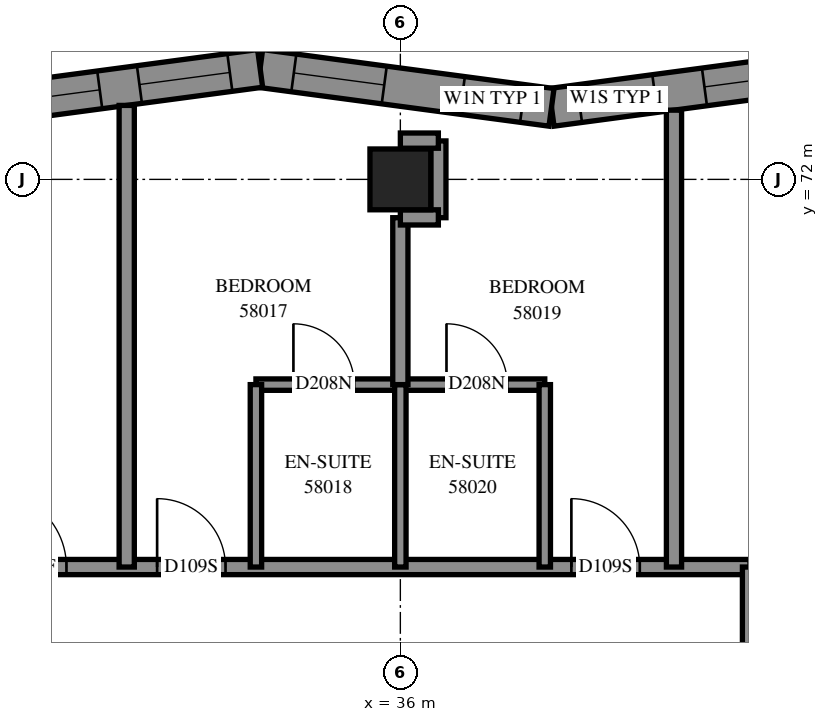
"""IFC4 building model, lengths in metres.
Left out: names, types, materials, properties, quantities, classifications, styles, units other than length and angle.
Written with IfcOpenShell. Run it as: python <this file> out.ifc"""

import sys

from ifc_helpers import new_model, si_unit, direction, frame, frame_2d, origin, origin_2d, place, context, subcontext, project, spatial, polyline, rectangle, outline, extrude, element, fill, save


model = new_model("IFC4")
c1 = context("Model", 3, precision=1e-05, world=origin(), true_north=direction((0.0, 1.0)))
c2 = subcontext(c1, "Body", "Model", "MODEL_VIEW")
j1 = project(units=[si_unit("LENGTHUNIT", "METRE"), si_unit("PLANEANGLEUNIT", "RADIAN")], contexts=[c1])
p1 = place(None, origin())
s1 = spatial("IfcSite", under=j1, at=p1, CompositionType="ELEMENT")
p2 = place(p1, origin())
s2 = spatial("IfcBuilding", under=s1, at=p2, CompositionType="ELEMENT")
p3 = place(p2, frame((0.0, 0.0, 213.4)))
s3 = spatial("IfcBuildingStorey", under=s2, at=p3, CompositionType="ELEMENT", Elevation=213.4)
p4 = place(p3, frame((36.0, 72.0, 0.0), z_axis=(0.0, 0.0, 1.0), x_axis=(1.0, 0.0, 0.0)))
e1 = element("IfcColumn", 1, at=p4, inside=s3, PredefinedType="COLUMN", context=c2, shape_type="SweptSolid", body=[
    extrude(rectangle(XDim=0.8, YDim=0.8, at=origin_2d()), origin(), (0.0, 0.0, 1.0), 3.1),
])
p5 = place(p3, frame((41.822, 73.46, 0.0), z_axis=(0.0, 0.0, 1.0), x_axis=(-0.9911985198, -0.13238389, 0.0)))
e2 = element("IfcWall", 2, at=p5, inside=s3, PredefinedType="SOLIDWALL", context=c2, shape_type="SweptSolid", body=[
    extrude(outline(polyline([(-0.033, -0.25), (3.834, -0.25), (3.901, 0.25), (0.033, 0.25), (-0.033, -0.25)])), origin(), (0.0, 0.0, 1.0), 3.1),
])
p6 = place(p5, frame((0.638, 0.0, 0.45)))
e3 = element("IfcOpeningElement", 3, at=p6, cuts=e2, PredefinedType="OPENING", context=c2, shape_type="SweptSolid", body=[
    extrude(rectangle(XDim=1.2, YDim=2.5, at=frame_2d((0.6, 1.25))), frame((0.0, 0.26, 0.0), z_axis=(0.0, -1.0, 0.0), x_axis=(1.0, 0.0, 0.0)), (0.0, 0.0, 1.0), 0.52),
])
p7 = place(p5, frame((2.496, 0.0, 0.45)))
e4 = element("IfcOpeningElement", 4, at=p7, cuts=e2, PredefinedType="OPENING", context=c2, shape_type="SweptSolid", body=[
    extrude(rectangle(XDim=1.0, YDim=2.5, at=frame_2d((0.5, 1.25))), frame((0.0, 0.26, 0.0), z_axis=(0.0, -1.0, 0.0), x_axis=(1.0, 0.0, 0.0)), (0.0, 0.0, 1.0), 0.52),
])
p8 = place(p3, frame((37.989, 72.948, 0.0), z_axis=(0.0, 0.0, 1.0), x_axis=(-0.9911989729, 0.1323804972, 0.0)))
e5 = element("IfcWall", 5, at=p8, inside=s3, PredefinedType="SOLIDWALL", context=c2, shape_type="SweptSolid", body=[
    extrude(outline(polyline([(0.033, -0.25), (3.901, -0.25), (3.834, 0.25), (-0.033, 0.25), (0.033, -0.25)])), origin(), (0.0, 0.0, 1.0), 3.1),
])
p9 = place(p8, frame((2.22, 0.0, 0.45)))
e6 = element("IfcOpeningElement", 6, at=p9, cuts=e5, PredefinedType="OPENING", context=c2, shape_type="SweptSolid", body=[
    extrude(rectangle(XDim=1.2, YDim=2.5, at=frame_2d((0.6, 1.25))), frame((0.0, 0.26, 0.0), z_axis=(0.0, -1.0, 0.0), x_axis=(1.0, 0.0, 0.0)), (0.0, 0.0, 1.0), 0.52),
])
p10 = place(p8, frame((0.384, 0.0, 0.45)))
e7 = element("IfcOpeningElement", 7, at=p10, cuts=e5, PredefinedType="OPENING", context=c2, shape_type="SweptSolid", body=[
    extrude(rectangle(XDim=0.8, YDim=2.5, at=frame_2d((0.4, 1.25))), frame((0.0, 0.26, 0.0), z_axis=(0.0, -1.0, 0.0), x_axis=(1.0, 0.0, 0.0)), (0.0, 0.0, 1.0), 0.52),
])
p11 = place(p3, frame((34.155, 73.46, 0.0), z_axis=(0.0, 0.0, 1.0), x_axis=(-0.991196865, -0.1323962796, 0.0)))
e8 = element("IfcWall", 8, at=p11, inside=s3, PredefinedType="SOLIDWALL", context=c2, shape_type="SweptSolid", body=[
    extrude(outline(polyline([(-0.033, -0.25), (3.834, -0.25), (3.939, 0.25), (0.033, 0.25), (-0.033, -0.25)])), origin(), (0.0, 0.0, 1.0), 3.1),
])
p12 = place(p11, frame((0.402, 0.0, 0.45)))
e9 = element("IfcOpeningElement", 9, at=p12, cuts=e8, PredefinedType="OPENING", context=c2, shape_type="SweptSolid", body=[
    extrude(rectangle(XDim=1.2, YDim=2.5, at=frame_2d((0.6, 1.25))), frame((0.0, 0.26, 0.0), z_axis=(0.0, -1.0, 0.0), x_axis=(1.0, 0.0, 0.0)), (0.0, 0.0, 1.0), 0.52),
])
p13 = place(p11, frame((2.129, 0.0, 0.45)))
e10 = element("IfcOpeningElement", 10, at=p13, cuts=e8, PredefinedType="OPENING", context=c2, shape_type="SweptSolid", body=[
    extrude(rectangle(XDim=1.2, YDim=2.5, at=frame_2d((0.6, 1.25))), frame((0.0, 0.26, 0.0), z_axis=(0.0, -1.0, 0.0), x_axis=(1.0, 0.0, 0.0)), (0.0, 0.0, 1.0), 0.52),
])
p14 = place(p3, frame((28.802, 66.9, 0.0), z_axis=(0.0, 0.0, 1.0), x_axis=(1.0, 0.0, 0.0)))
e11 = element("IfcWall", 11, at=p14, inside=s3, PredefinedType="PARTITIONING", context=c2, shape_type="SweptSolid", body=[
    extrude(rectangle(XDim=11.798, YDim=0.2, at=frame_2d((5.899, 0.0))), origin(), (0.0, 0.0, 1.0), 3.1),
])
p15 = place(p14, frame((1.805, 0.0, 0.0)))
e12 = element("IfcOpeningElement", 12, at=p15, cuts=e11, PredefinedType="OPENING", context=c2, shape_type="SweptSolid", body=[
    extrude(rectangle(XDim=1.0, YDim=2.1, at=frame_2d((0.5, 1.05))), frame((0.0, 0.11, 0.0), z_axis=(0.0, -1.0, 0.0), x_axis=(1.0, 0.0, 0.0)), (0.0, 0.0, 1.0), 0.22),
])
p16 = place(p14, frame((3.998, 0.0, 0.0)))
e13 = element("IfcOpeningElement", 13, at=p16, cuts=e11, PredefinedType="OPENING", context=c2, shape_type="SweptSolid", body=[
    extrude(rectangle(XDim=0.9, YDim=2.1, at=frame_2d((0.45, 1.05))), frame((0.0, 0.11, 0.0), z_axis=(0.0, -1.0, 0.0), x_axis=(1.0, 0.0, 0.0)), (0.0, 0.0, 1.0), 0.22),
])
p17 = place(p14, frame((9.448, 0.0, 0.0)))
e14 = element("IfcOpeningElement", 14, at=p17, cuts=e11, PredefinedType="OPENING", context=c2, shape_type="SweptSolid", body=[
    extrude(rectangle(XDim=0.9, YDim=2.1, at=frame_2d((0.45, 1.05))), frame((0.0, 0.11, 0.0), z_axis=(0.0, -1.0, 0.0), x_axis=(1.0, 0.0, 0.0)), (0.0, 0.0, 1.0), 0.22),
])
p18 = place(p3, frame((32.4, 66.9, 0.0), z_axis=(0.0, 0.0, 1.0), x_axis=(0.0, 1.0, 0.0)))
e15 = element("IfcWall", 15, at=p18, inside=s3, PredefinedType="PARTITIONING", context=c2, shape_type="SweptSolid", body=[
    extrude(rectangle(XDim=6.073, YDim=0.2, at=frame_2d((3.037, 0.0))), origin(), (0.0, 0.0, 1.0), 3.1),
])
p19 = place(p3, frame((39.6, 66.9, 0.0), z_axis=(0.0, 0.0, 1.0), x_axis=(0.0, 1.0, 0.0)))
e16 = element("IfcWall", 16, at=p19, inside=s3, PredefinedType="PARTITIONING", context=c2, shape_type="SweptSolid", body=[
    extrude(rectangle(XDim=6.011, YDim=0.2, at=frame_2d((3.005, 0.0))), origin(), (0.0, 0.0, 1.0), 3.1),
])
p20 = place(p3, frame((40.6, 62.202, 0.0), z_axis=(0.0, 0.0, 1.0), x_axis=(0.0, 1.0, 0.0)))
e17 = element("IfcWall", 17, at=p20, inside=s3, PredefinedType="PARTITIONING", context=c2, shape_type="SweptSolid", body=[
    extrude(rectangle(XDim=4.698, YDim=0.2, at=frame_2d((2.349, 0.0))), origin(), (0.0, 0.0, 1.0), 3.1),
])
p21 = place(p20, frame((2.51, 0.0, 0.0)))
e18 = element("IfcOpeningElement", 18, at=p21, cuts=e17, PredefinedType="OPENING", context=c2, shape_type="SweptSolid", body=[
    extrude(rectangle(XDim=0.9, YDim=2.1, at=frame_2d((0.45, 1.05))), frame((0.0, 0.11, 0.0), z_axis=(0.0, -1.0, 0.0), x_axis=(1.0, 0.0, 0.0)), (0.0, 0.0, 1.0), 0.22),
])
p22 = place(p3, frame((34.1, 69.3, 0.0), z_axis=(0.0, 0.0, 1.0), x_axis=(1.0, 0.0, 0.0)))
e19 = element("IfcWall", 19, at=p22, inside=s3, PredefinedType="PARTITIONING", context=c2, shape_type="SweptSolid", body=[
    extrude(rectangle(XDim=3.8, YDim=0.15, at=frame_2d((1.9, 0.0))), origin(), (0.0, 0.0, 1.0), 3.1),
])
p23 = place(p22, frame((0.493, 0.0, 0.0)))
e20 = element("IfcOpeningElement", 20, at=p23, cuts=e19, PredefinedType="OPENING", context=c2, shape_type="SweptSolid", body=[
    extrude(rectangle(XDim=0.8, YDim=2.1, at=frame_2d((0.4, 1.05))), frame((0.0, 0.085, 0.0), z_axis=(0.0, -1.0, 0.0), x_axis=(1.0, 0.0, 0.0)), (0.0, 0.0, 1.0), 0.17),
])
p24 = place(p22, frame((2.507, 0.0, 0.0)))
e21 = element("IfcOpeningElement", 21, at=p24, cuts=e19, PredefinedType="OPENING", context=c2, shape_type="SweptSolid", body=[
    extrude(rectangle(XDim=0.8, YDim=2.1, at=frame_2d((0.4, 1.05))), frame((0.0, 0.085, 0.0), z_axis=(0.0, -1.0, 0.0), x_axis=(1.0, 0.0, 0.0)), (0.0, 0.0, 1.0), 0.17),
])
for number, where, z_axis, x_axis in (
    (22, (34.1, 66.9, 0.0), (0.0, 0.0, 1.0), (0.0, 1.0, 0.0)),
    (23, (36.0, 66.9, 0.0), (0.0, 0.0, 1.0), (0.0, 1.0, 0.0)),
    (24, (37.9, 66.9, 0.0), (0.0, 0.0, 1.0), (0.0, 1.0, 0.0)),
):
    element("IfcWall", number, at=place(p3, frame(where, z_axis=z_axis, x_axis=x_axis)), inside=s3, PredefinedType="PARTITIONING", context=c2, shape_type="SweptSolid", body=[
        extrude(rectangle(XDim=2.4, YDim=0.15, at=frame_2d((1.2, 0.0))), origin(), (0.0, 0.0, 1.0), 3.1),
    ])
p25 = place(p3, frame((36.0, 69.3, 0.0), z_axis=(0.0, 0.0, 1.0), x_axis=(0.0, 1.0, 0.0)))
e25 = element("IfcWall", 25, at=p25, inside=s3, PredefinedType="PARTITIONING", context=c2, shape_type="SweptSolid", body=[
    extrude(rectangle(XDim=2.196, YDim=0.2, at=frame_2d((1.098, 0.0))), origin(), (0.0, 0.0, 1.0), 3.1),
])
p26 = place(p3, frame((36.5, 71.496, 0.0), z_axis=(0.0, 0.0, 1.0), x_axis=(0.0, 1.0, 0.0)))
e26 = element("IfcWall", 26, at=p26, inside=s3, PredefinedType="PARTITIONING", context=c2, shape_type="SweptSolid", body=[
    extrude(rectangle(XDim=1.01, YDim=0.2, at=frame_2d((0.505, 0.0))), origin(), (0.0, 0.0, 1.0), 3.1),
])
for number, where, z_axis, x_axis in (
    (27, (36.0, 72.51, 0.0), (0.0, 0.0, 1.0), (1.0, 0.0, 0.0)),
    (28, (36.0, 71.5, 0.0), (0.0, 0.0, 1.0), (1.0, 0.0, 0.0)),
):
    element("IfcWall", number, at=place(p3, frame(where, z_axis=z_axis, x_axis=x_axis)), inside=s3, PredefinedType="PARTITIONING", context=c2, shape_type="SweptSolid", body=[
        extrude(rectangle(XDim=0.5, YDim=0.2, at=frame_2d((0.25, 0.0))), origin(), (0.0, 0.0, 1.0), 3.1),
    ])
p27 = place(p6, origin())
e29 = element("IfcWindow", 29, at=p27, inside=s3, PartitioningType="SINGLE_PANEL", PredefinedType="WINDOW", context=c2, shape_type="SweptSolid", body=[
    extrude(rectangle(XDim=1.2, YDim=2.5, at=frame_2d((0.6, 1.25))), frame((0.0, 0.18, 0.0), z_axis=(0.0, -1.0, 0.0), x_axis=(1.0, 0.0, 0.0)), (0.0, 0.0, 1.0), 0.06),
])
fill(e3, e29)
p28 = place(p9, origin())
e30 = element("IfcWindow", 30, at=p28, inside=s3, PartitioningType="SINGLE_PANEL", PredefinedType="WINDOW", context=c2, shape_type="SweptSolid", body=[
    extrude(rectangle(XDim=1.2, YDim=2.5, at=frame_2d((0.6, 1.25))), frame((0.0, 0.18, 0.0), z_axis=(0.0, -1.0, 0.0), x_axis=(1.0, 0.0, 0.0)), (0.0, 0.0, 1.0), 0.06),
])
fill(e6, e30)
p29 = place(p12, origin())
e31 = element("IfcWindow", 31, at=p29, inside=s3, PartitioningType="SINGLE_PANEL", PredefinedType="WINDOW", context=c2, shape_type="SweptSolid", body=[
    extrude(rectangle(XDim=1.2, YDim=2.5, at=frame_2d((0.6, 1.25))), frame((0.0, 0.18, 0.0), z_axis=(0.0, -1.0, 0.0), x_axis=(1.0, 0.0, 0.0)), (0.0, 0.0, 1.0), 0.06),
])
fill(e9, e31)
p30 = place(p13, origin())
e32 = element("IfcWindow", 32, at=p30, inside=s3, PartitioningType="SINGLE_PANEL", PredefinedType="WINDOW", context=c2, shape_type="SweptSolid", body=[
    extrude(rectangle(XDim=1.2, YDim=2.5, at=frame_2d((0.6, 1.25))), frame((0.0, 0.18, 0.0), z_axis=(0.0, -1.0, 0.0), x_axis=(1.0, 0.0, 0.0)), (0.0, 0.0, 1.0), 0.06),
])
fill(e10, e32)
p31 = place(p15, origin())
e33 = element("IfcDoor", 33, at=p31, inside=s3, OperationType="SINGLE_SWING_RIGHT", PredefinedType="DOOR", context=c2, shape_type="SweptSolid", body=[
    extrude(rectangle(XDim=1.0, YDim=2.1, at=frame_2d((0.5, 1.05))), frame((0.0, 0.025, 0.0), z_axis=(0.0, -1.0, 0.0), x_axis=(1.0, 0.0, 0.0)), (0.0, 0.0, 1.0), 0.05),
])
fill(e12, e33)
p32 = place(p16, origin())
e34 = element("IfcDoor", 34, at=p32, inside=s3, OperationType="SINGLE_SWING_LEFT", PredefinedType="DOOR", context=c2, shape_type="SweptSolid", body=[
    extrude(rectangle(XDim=0.9, YDim=2.1, at=frame_2d((0.45, 1.05))), frame((0.0, 0.025, 0.0), z_axis=(0.0, -1.0, 0.0), x_axis=(1.0, 0.0, 0.0)), (0.0, 0.0, 1.0), 0.05),
])
fill(e13, e34)
p33 = place(p23, origin())
e35 = element("IfcDoor", 35, at=p33, inside=s3, OperationType="SINGLE_SWING_RIGHT", PredefinedType="DOOR", context=c2, shape_type="SweptSolid", body=[
    extrude(rectangle(XDim=0.8, YDim=2.1, at=frame_2d((0.4, 1.05))), frame((0.0, 0.025, 0.0), z_axis=(0.0, -1.0, 0.0), x_axis=(1.0, 0.0, 0.0)), (0.0, 0.0, 1.0), 0.05),
])
fill(e20, e35)
p34 = place(p17, origin())
e36 = element("IfcDoor", 36, at=p34, inside=s3, OperationType="SINGLE_SWING_RIGHT", PredefinedType="DOOR", context=c2, shape_type="SweptSolid", body=[
    extrude(rectangle(XDim=0.9, YDim=2.1, at=frame_2d((0.45, 1.05))), frame((0.0, 0.025, 0.0), z_axis=(0.0, -1.0, 0.0), x_axis=(1.0, 0.0, 0.0)), (0.0, 0.0, 1.0), 0.05),
])
fill(e14, e36)
p35 = place(p24, origin())
e37 = element("IfcDoor", 37, at=p35, inside=s3, OperationType="SINGLE_SWING_RIGHT", PredefinedType="DOOR", context=c2, shape_type="SweptSolid", body=[
    extrude(rectangle(XDim=0.8, YDim=2.1, at=frame_2d((0.4, 1.05))), frame((0.0, 0.025, 0.0), z_axis=(0.0, -1.0, 0.0), x_axis=(1.0, 0.0, 0.0)), (0.0, 0.0, 1.0), 0.05),
])
fill(e21, e37)
p36 = place(p7, origin())
e38 = element("IfcWindow", 38, at=p36, inside=s3, PartitioningType="SINGLE_PANEL", PredefinedType="WINDOW", context=c2, shape_type="SweptSolid", body=[
    extrude(rectangle(XDim=1.0, YDim=2.5, at=frame_2d((0.5, 1.25))), frame((0.0, 0.18, 0.0), z_axis=(0.0, -1.0, 0.0), x_axis=(1.0, 0.0, 0.0)), (0.0, 0.0, 1.0), 0.06),
])
fill(e4, e38)
p37 = place(p10, origin())
e39 = element("IfcWindow", 39, at=p37, inside=s3, PartitioningType="SINGLE_PANEL", PredefinedType="WINDOW", context=c2, shape_type="SweptSolid", body=[
    extrude(rectangle(XDim=0.8, YDim=2.5, at=frame_2d((0.4, 1.25))), frame((0.0, 0.18, 0.0), z_axis=(0.0, -1.0, 0.0), x_axis=(1.0, 0.0, 0.0)), (0.0, 0.0, 1.0), 0.06),
])
fill(e7, e39)
save(model, sys.argv[1])
